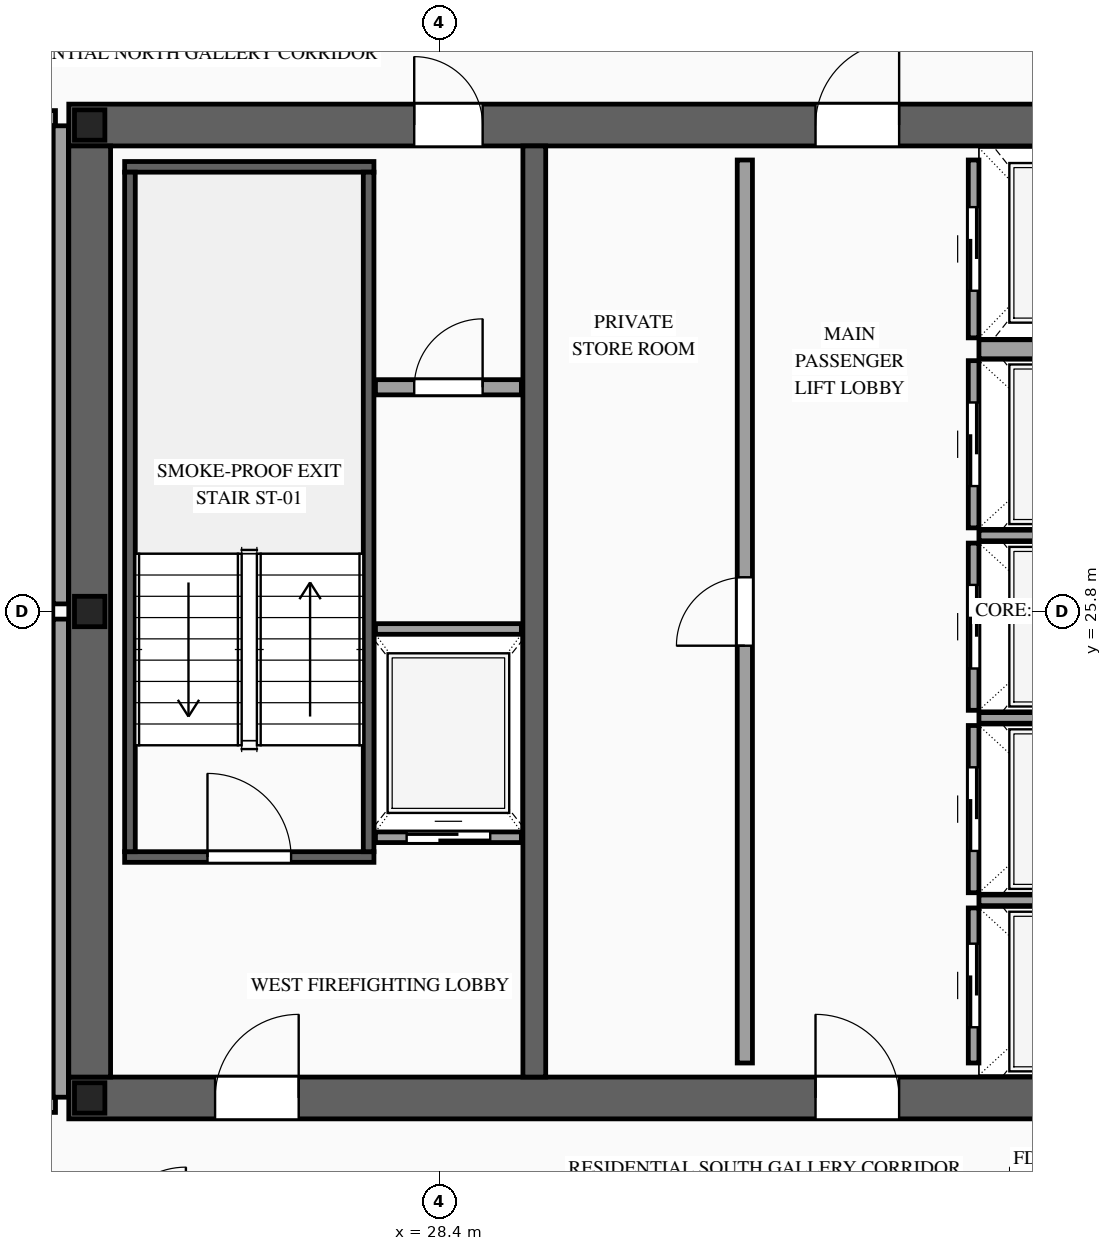
"""IFC4 building model, lengths in metres.
Left out: names, types, materials, properties, quantities, classifications, styles, units other than length and angle.
Written with IfcOpenShell. Run it as: python <this file> out.ifc"""

import sys

from ifc_helpers import new_model, si_unit, direction, frame, frame_2d, origin, origin_2d, place, context, subcontext, project, spatial, rectangle, i_section, extrude, source, transform, mapped, element, fill, save


model = new_model("IFC4")
c1 = context("Model", 3, precision=1e-05, world=origin(), true_north=direction((0.0, 1.0)))
c2 = subcontext(c1, "Body", "Model", "MODEL_VIEW")
j1 = project(units=[si_unit("LENGTHUNIT", "METRE"), si_unit("PLANEANGLEUNIT", "RADIAN")], contexts=[c1])
p1 = place(None, origin())
s1 = spatial("IfcSite", under=j1, at=p1, CompositionType="ELEMENT")
p2 = place(p1, origin())
s2 = spatial("IfcBuilding", under=s1, at=p2, CompositionType="ELEMENT")
p3 = place(p2, frame((0.0, 0.0, 248.6)))
s3 = spatial("IfcBuildingStorey", under=s2, at=p3, CompositionType="ELEMENT", Elevation=248.6)
p4 = place(p3, frame((23.525, 19.4, 0.0), z_axis=(0.0, 0.0, 1.0), x_axis=(1.0, 0.0, 0.0)))
e1 = element("IfcWall", 1, at=p4, inside=s3, PredefinedType="SHEAR", context=c2, shape_type="SweptSolid", body=[
    extrude(rectangle(XDim=26.95, YDim=0.55, at=frame_2d((13.475, 0.0))), origin(), (0.0, 0.0, 1.0), 3.5),
])
p5 = place(p4, frame((1.925, 0.0, 0.0)))
e2 = element("IfcOpeningElement", 2, at=p5, cuts=e1, PredefinedType="OPENING", context=c2, shape_type="SweptSolid", body=[
    extrude(rectangle(XDim=1.1, YDim=2.2, at=frame_2d((0.55, 1.1))), frame((0.0, 0.29, 0.0), z_axis=(0.0, -1.0, 0.0), x_axis=(1.0, 0.0, 0.0)), (0.0, 0.0, 1.0), 0.58),
])
p6 = place(p4, frame((9.825, 0.0, 0.0)))
e3 = element("IfcOpeningElement", 3, at=p6, cuts=e1, PredefinedType="OPENING", context=c2, shape_type="SweptSolid", body=[
    extrude(rectangle(XDim=1.1, YDim=2.2, at=frame_2d((0.55, 1.1))), frame((0.0, 0.29, 0.0), z_axis=(0.0, -1.0, 0.0), x_axis=(1.0, 0.0, 0.0)), (0.0, 0.0, 1.0), 0.58),
])
p7 = place(p4, frame((23.025, 0.0, 0.0)))
e4 = element("IfcOpeningElement", 4, at=p7, cuts=e1, PredefinedType="OPENING", context=c2, shape_type="SweptSolid", body=[
    extrude(rectangle(XDim=1.1, YDim=2.2, at=frame_2d((0.55, 1.1))), frame((0.0, 0.29, 0.0), z_axis=(0.0, -1.0, 0.0), x_axis=(1.0, 0.0, 0.0)), (0.0, 0.0, 1.0), 0.58),
])
p8 = place(p4, frame((19.645, 0.0, 0.0)))
e5 = element("IfcOpeningElement", 5, at=p8, cuts=e1, PredefinedType="OPENING", context=c2, shape_type="SweptSolid", body=[
    extrude(rectangle(XDim=0.9, YDim=2.15, at=frame_2d((0.45, 1.075))), frame((0.0, 0.29, 0.0), z_axis=(0.0, -1.0, 0.0), x_axis=(1.0, 0.0, 0.0)), (0.0, 0.0, 1.0), 0.58),
])
p9 = place(p4, frame((18.205, 0.0, 0.0)))
e6 = element("IfcOpeningElement", 6, at=p9, cuts=e1, PredefinedType="OPENING", context=c2, shape_type="SweptSolid", body=[
    extrude(rectangle(XDim=0.9, YDim=2.15, at=frame_2d((0.45, 1.075))), frame((0.0, 0.29, 0.0), z_axis=(0.0, -1.0, 0.0), x_axis=(1.0, 0.0, 0.0)), (0.0, 0.0, 1.0), 0.58),
])
p10 = place(p3, frame((23.525, 32.2, 0.0), z_axis=(0.0, 0.0, 1.0), x_axis=(1.0, 0.0, 0.0)))
e7 = element("IfcWall", 7, at=p10, inside=s3, PredefinedType="SHEAR", context=c2, shape_type="SweptSolid", body=[
    extrude(rectangle(XDim=26.95, YDim=0.55, at=frame_2d((13.475, 0.0))), origin(), (0.0, 0.0, 1.0), 3.5),
])
p11 = place(p10, frame((4.545, 0.0, 0.0)))
e8 = element("IfcOpeningElement", 8, at=p11, cuts=e7, PredefinedType="OPENING", context=c2, shape_type="SweptSolid", body=[
    extrude(rectangle(XDim=0.9, YDim=2.15, at=frame_2d((0.45, 1.075))), frame((0.0, 0.29, 0.0), z_axis=(0.0, -1.0, 0.0), x_axis=(1.0, 0.0, 0.0)), (0.0, 0.0, 1.0), 0.58),
])
p12 = place(p10, frame((9.825, 0.0, 0.0)))
e9 = element("IfcOpeningElement", 9, at=p12, cuts=e7, PredefinedType="OPENING", context=c2, shape_type="SweptSolid", body=[
    extrude(rectangle(XDim=1.1, YDim=2.2, at=frame_2d((0.55, 1.1))), frame((0.0, 0.29, 0.0), z_axis=(0.0, -1.0, 0.0), x_axis=(1.0, 0.0, 0.0)), (0.0, 0.0, 1.0), 0.58),
])
p13 = place(p10, frame((15.675, 0.0, 0.0)))
e10 = element("IfcOpeningElement", 10, at=p13, cuts=e7, PredefinedType="OPENING", context=c2, shape_type="SweptSolid", body=[
    extrude(rectangle(XDim=1.1, YDim=2.2, at=frame_2d((0.55, 1.1))), frame((0.0, 0.29, 0.0), z_axis=(0.0, -1.0, 0.0), x_axis=(1.0, 0.0, 0.0)), (0.0, 0.0, 1.0), 0.58),
])
m1 = source(origin(), c2, "Body", "SweptSolid", [
    extrude(rectangle(XDim=12.25, YDim=0.55, at=frame_2d((6.125, 0.0))), origin(), (0.0, 0.0, 1.0), 3.5),
])
p14 = place(p3, frame((23.8, 19.675, 0.0), z_axis=(0.0, 0.0, 1.0), x_axis=(0.0, 1.0, 0.0)))
e11 = element("IfcWall", 11, at=p14, inside=s3, PredefinedType="SHEAR", context=c2, shape_type="MappedRepresentation", body=[
    mapped(m1, transform((0.0, 0.0, 0.0), scale=1.0)),
])
m2 = source(origin(), c2, "Body", "SweptSolid", [
    extrude(rectangle(XDim=12.25, YDim=0.3, at=frame_2d((6.125, 0.0))), origin(), (0.0, 0.0, 1.0), 3.5),
])
p15 = place(p3, frame((29.65, 19.675, 0.0), z_axis=(0.0, 0.0, 1.0), x_axis=(0.0, 1.0, 0.0)))
e12 = element("IfcWall", 12, at=p15, inside=s3, PredefinedType="SOLIDWALL", context=c2, shape_type="MappedRepresentation", body=[
    mapped(m2, transform((0.0, 0.0, 0.0), scale=1.0)),
])
m3 = source(origin(), c2, "Body", "SweptSolid", [
    extrude(i_section(OverallWidth=0.4, OverallDepth=0.4, WebThickness=0.013, FlangeThickness=0.021, at=origin_2d()), origin(), (0.0, 0.0, 1.0), 3.5),
])
for number, where, z_axis, x_axis in (
    (13, (23.8, 19.4, 0.0), (0.0, 0.0, 1.0), (1.0, 0.0, 0.0)),
    (14, (23.8, 25.8, 0.0), (0.0, 0.0, 1.0), (1.0, 0.0, 0.0)),
    (15, (23.8, 32.2, 0.0), (0.0, 0.0, 1.0), (1.0, 0.0, 0.0)),
):
    element("IfcColumn", number, at=place(p3, frame(where, z_axis=z_axis, x_axis=x_axis)), inside=s3, PredefinedType="COLUMN", context=c2, shape_type="MappedRepresentation", body=[
        mapped(m3, transform((0.0, 0.0, 0.0), scale=1.0)),
    ])
p16 = place(p3, frame((27.56, 22.83, 0.0), z_axis=(0.0, 0.0, 1.0), x_axis=(1.0, 0.0, 0.0)))
e16 = element("IfcWall", 16, at=p16, inside=s3, PredefinedType="SOLIDWALL", context=c2, shape_type="SweptSolid", body=[
    extrude(rectangle(XDim=1.92, YDim=0.14, at=frame_2d((0.96, 0.0))), origin(), (0.0, 0.0, 1.0), 3.28),
])
p17 = place(p16, frame((0.41, 0.0, 0.0)))
e17 = element("IfcOpeningElement", 17, at=p17, cuts=e16, PredefinedType="OPENING", context=c2, shape_type="SweptSolid", body=[
    extrude(rectangle(XDim=1.1, YDim=2.2, at=frame_2d((0.55, 1.1))), frame((0.0, 0.085, 0.0), z_axis=(0.0, -1.0, 0.0), x_axis=(1.0, 0.0, 0.0)), (0.0, 0.0, 1.0), 0.17),
])
m4 = source(origin(), c2, "Body", "SweptSolid", [
    extrude(rectangle(XDim=1.92, YDim=0.14, at=frame_2d((0.96, 0.0))), origin(), (0.0, 0.0, 1.0), 3.28),
])
p18 = place(p3, frame((27.56, 25.57, 0.0), z_axis=(0.0, 0.0, 1.0), x_axis=(1.0, 0.0, 0.0)))
e18 = element("IfcWall", 18, at=p18, inside=s3, PredefinedType="SOLIDWALL", context=c2, shape_type="MappedRepresentation", body=[
    mapped(m4, transform((0.0, 0.0, 0.0), scale=1.0)),
])
p19 = place(p3, frame((35.43, 19.86, 0.0), z_axis=(0.0, 0.0, 1.0), x_axis=(0.0, 1.0, 0.0)))
e19 = element("IfcWall", 19, at=p19, inside=s3, PredefinedType="SOLIDWALL", context=c2, shape_type="SweptSolid", body=[
    extrude(rectangle(XDim=2.04, YDim=0.14, at=frame_2d((1.02, 0.0))), origin(), (0.0, 0.0, 1.0), 3.28),
])
p20 = place(p19, frame((0.47, 0.0, 0.0)))
e20 = element("IfcOpeningElement", 20, at=p20, cuts=e19, PredefinedType="OPENING", context=c2, shape_type="SweptSolid", body=[
    extrude(rectangle(XDim=1.1, YDim=2.2, at=frame_2d((0.55, 1.1))), frame((0.0, 0.085, 0.0), z_axis=(0.0, -1.0, 0.0), x_axis=(1.0, 0.0, 0.0)), (0.0, 0.0, 1.0), 0.17),
])
m5 = source(origin(), c2, "Body", "SweptSolid", [
    extrude(rectangle(XDim=2.4, YDim=0.14, at=frame_2d((1.2, 0.0))), origin(), (0.0, 0.0, 1.0), 3.28),
])
p21 = place(p3, frame((35.5, 22.0, 0.0), z_axis=(0.0, 0.0, 1.0), x_axis=(1.0, 0.0, 0.0)))
e21 = element("IfcWall", 21, at=p21, inside=s3, PredefinedType="SOLIDWALL", context=c2, shape_type="MappedRepresentation", body=[
    mapped(m5, transform((0.0, 0.0, 0.0), scale=1.0)),
])
p22 = place(p3, frame((35.43, 22.1, 0.0), z_axis=(0.0, 0.0, 1.0), x_axis=(0.0, 1.0, 0.0)))
e22 = element("IfcWall", 22, at=p22, inside=s3, PredefinedType="SOLIDWALL", context=c2, shape_type="SweptSolid", body=[
    extrude(rectangle(XDim=2.2, YDim=0.14, at=frame_2d((1.1, 0.0))), origin(), (0.0, 0.0, 1.0), 3.28),
])
p23 = place(p22, frame((0.55, 0.0, 0.0)))
e23 = element("IfcOpeningElement", 23, at=p23, cuts=e22, PredefinedType="OPENING", context=c2, shape_type="SweptSolid", body=[
    extrude(rectangle(XDim=1.1, YDim=2.2, at=frame_2d((0.55, 1.1))), frame((0.0, 0.085, 0.0), z_axis=(0.0, -1.0, 0.0), x_axis=(1.0, 0.0, 0.0)), (0.0, 0.0, 1.0), 0.17),
])
p24 = place(p3, frame((35.5, 24.4, 0.0), z_axis=(0.0, 0.0, 1.0), x_axis=(1.0, 0.0, 0.0)))
e24 = element("IfcWall", 24, at=p24, inside=s3, PredefinedType="SOLIDWALL", context=c2, shape_type="MappedRepresentation", body=[
    mapped(m5, transform((0.0, 0.0, 0.0), scale=1.0)),
])
p25 = place(p3, frame((35.43, 24.5, 0.0), z_axis=(0.0, 0.0, 1.0), x_axis=(0.0, 1.0, 0.0)))
e25 = element("IfcWall", 25, at=p25, inside=s3, PredefinedType="SOLIDWALL", context=c2, shape_type="SweptSolid", body=[
    extrude(rectangle(XDim=2.2, YDim=0.14, at=frame_2d((1.1, 0.0))), origin(), (0.0, 0.0, 1.0), 3.28),
])
p26 = place(p25, frame((0.55, 0.0, 0.0)))
e26 = element("IfcOpeningElement", 26, at=p26, cuts=e25, PredefinedType="OPENING", context=c2, shape_type="SweptSolid", body=[
    extrude(rectangle(XDim=1.1, YDim=2.2, at=frame_2d((0.55, 1.1))), frame((0.0, 0.085, 0.0), z_axis=(0.0, -1.0, 0.0), x_axis=(1.0, 0.0, 0.0)), (0.0, 0.0, 1.0), 0.17),
])
p27 = place(p3, frame((35.5, 26.8, 0.0), z_axis=(0.0, 0.0, 1.0), x_axis=(1.0, 0.0, 0.0)))
e27 = element("IfcWall", 27, at=p27, inside=s3, PredefinedType="SOLIDWALL", context=c2, shape_type="MappedRepresentation", body=[
    mapped(m5, transform((0.0, 0.0, 0.0), scale=1.0)),
])
p28 = place(p3, frame((35.43, 26.9, 0.0), z_axis=(0.0, 0.0, 1.0), x_axis=(0.0, 1.0, 0.0)))
e28 = element("IfcWall", 28, at=p28, inside=s3, PredefinedType="SOLIDWALL", context=c2, shape_type="SweptSolid", body=[
    extrude(rectangle(XDim=2.2, YDim=0.14, at=frame_2d((1.1, 0.0))), origin(), (0.0, 0.0, 1.0), 3.28),
])
p29 = place(p28, frame((0.55, 0.0, 0.0)))
e29 = element("IfcOpeningElement", 29, at=p29, cuts=e28, PredefinedType="OPENING", context=c2, shape_type="SweptSolid", body=[
    extrude(rectangle(XDim=1.1, YDim=2.2, at=frame_2d((0.55, 1.1))), frame((0.0, 0.085, 0.0), z_axis=(0.0, -1.0, 0.0), x_axis=(1.0, 0.0, 0.0)), (0.0, 0.0, 1.0), 0.17),
])
p30 = place(p3, frame((35.43, 29.4, 0.0), z_axis=(0.0, 0.0, 1.0), x_axis=(0.0, 1.0, 0.0)))
e30 = element("IfcWall", 30, at=p30, inside=s3, PredefinedType="SOLIDWALL", context=c2, shape_type="SweptSolid", body=[
    extrude(rectangle(XDim=2.34, YDim=0.14, at=frame_2d((1.17, 0.0))), origin(), (0.0, 0.0, 1.0), 3.28),
])
p31 = place(p30, frame((0.62, 0.0, 0.0)))
e31 = element("IfcOpeningElement", 31, at=p31, cuts=e30, PredefinedType="OPENING", context=c2, shape_type="SweptSolid", body=[
    extrude(rectangle(XDim=1.1, YDim=2.2, at=frame_2d((0.55, 1.1))), frame((0.0, 0.085, 0.0), z_axis=(0.0, -1.0, 0.0), x_axis=(1.0, 0.0, 0.0)), (0.0, 0.0, 1.0), 0.17),
])
m6 = source(origin(), c2, "Body", "SweptSolid", [
    extrude(rectangle(XDim=2.4, YDim=0.25, at=frame_2d((1.2, 0.0))), origin(), (0.0, 0.0, 1.0), 3.28),
])
p32 = place(p3, frame((35.5, 29.25, 0.0), z_axis=(0.0, 0.0, 1.0), x_axis=(1.0, 0.0, 0.0)))
e32 = element("IfcWall", 32, at=p32, inside=s3, PredefinedType="SOLIDWALL", context=c2, shape_type="MappedRepresentation", body=[
    mapped(m6, transform((0.0, 0.0, 0.0), scale=1.0)),
])
p33 = place(p3, frame((24.26, 22.57, 0.0), z_axis=(0.0, 0.0, 1.0), x_axis=(1.0, 0.0, 0.0)))
e33 = element("IfcWall", 33, at=p33, inside=s3, PredefinedType="SOLIDWALL", context=c2, shape_type="SweptSolid", body=[
    extrude(rectangle(XDim=3.28, YDim=0.14, at=frame_2d((1.64, 0.0))), origin(), (0.0, 0.0, 1.0), 3.28),
])
p34 = place(p33, frame((1.09, 0.0, 0.0)))
e34 = element("IfcOpeningElement", 34, at=p34, cuts=e33, PredefinedType="OPENING", context=c2, shape_type="SweptSolid", body=[
    extrude(rectangle(XDim=1.1, YDim=2.2, at=frame_2d((0.55, 1.1))), frame((0.0, 0.085, 0.0), z_axis=(0.0, -1.0, 0.0), x_axis=(1.0, 0.0, 0.0)), (0.0, 0.0, 1.0), 0.17),
])
m7 = source(origin(), c2, "Body", "SweptSolid", [
    extrude(rectangle(XDim=3.28, YDim=0.14, at=frame_2d((1.64, 0.0))), origin(), (0.0, 0.0, 1.0), 3.28),
])
p35 = place(p3, frame((24.26, 31.65, 0.0), z_axis=(0.0, 0.0, 1.0), x_axis=(1.0, 0.0, 0.0)))
e35 = element("IfcWall", 35, at=p35, inside=s3, PredefinedType="SOLIDWALL", context=c2, shape_type="MappedRepresentation", body=[
    mapped(m7, transform((0.0, 0.0, 0.0), scale=1.0)),
])
m8 = source(origin(), c2, "Body", "SweptSolid", [
    extrude(rectangle(XDim=8.94, YDim=0.14, at=frame_2d((4.47, 0.0))), origin(), (0.0, 0.0, 1.0), 3.28),
])
for number, where, z_axis, x_axis in (
    (36, (24.33, 22.64, 0.0), (0.0, 0.0, 1.0), (0.0, 1.0, 0.0)),
    (37, (27.47, 22.64, 0.0), (0.0, 0.0, 1.0), (0.0, 1.0, 0.0)),
):
    element("IfcWall", number, at=place(p3, frame(where, z_axis=z_axis, x_axis=x_axis)), inside=s3, PredefinedType="SOLIDWALL", context=c2, shape_type="MappedRepresentation", body=[
        mapped(m8, transform((0.0, 0.0, 0.0), scale=1.0)),
    ])
p36 = place(p3, frame((27.56, 28.75, 0.0), z_axis=(0.0, 0.0, 1.0), x_axis=(1.0, 0.0, 0.0)))
e38 = element("IfcWall", 38, at=p36, inside=s3, PredefinedType="PARTITIONING", context=c2, shape_type="SweptSolid", body=[
    extrude(rectangle(XDim=1.92, YDim=0.2, at=frame_2d((0.96, 0.0))), origin(), (0.0, 0.0, 1.0), 3.28),
])
p37 = place(p36, frame((0.51, 0.0, 0.0)))
e39 = element("IfcOpeningElement", 39, at=p37, cuts=e38, PredefinedType="OPENING", context=c2, shape_type="SweptSolid", body=[
    extrude(rectangle(XDim=0.9, YDim=2.15, at=frame_2d((0.45, 1.075))), frame((0.0, 0.115, 0.0), z_axis=(0.0, -1.0, 0.0), x_axis=(1.0, 0.0, 0.0)), (0.0, 0.0, 1.0), 0.23),
])
p38 = place(p3, frame((32.42, 19.86, 0.0), z_axis=(0.0, 0.0, 1.0), x_axis=(0.0, 1.0, 0.0)))
e40 = element("IfcWall", 40, at=p38, inside=s3, PredefinedType="PARTITIONING", context=c2, shape_type="SweptSolid", body=[
    extrude(rectangle(XDim=11.88, YDim=0.2, at=frame_2d((5.94, 0.0))), origin(), (0.0, 0.0, 1.0), 3.28),
])
p39 = place(p38, frame((5.49, 0.0, 0.0)))
e41 = element("IfcOpeningElement", 41, at=p39, cuts=e40, PredefinedType="OPENING", context=c2, shape_type="SweptSolid", body=[
    extrude(rectangle(XDim=0.9, YDim=2.15, at=frame_2d((0.45, 1.075))), frame((0.0, 0.115, 0.0), z_axis=(0.0, -1.0, 0.0), x_axis=(1.0, 0.0, 0.0)), (0.0, 0.0, 1.0), 0.23),
])
p40 = place(p3, frame((16.55, 19.31, 0.0), z_axis=(0.0, 0.0, 1.0), x_axis=(1.0, 0.0, 0.0)))
e42 = element("IfcWall", 42, at=p40, inside=s3, PredefinedType="PARTITIONING", context=c2, shape_type="SweptSolid", body=[
    extrude(rectangle(XDim=6.8, YDim=0.2, at=frame_2d((3.4, 0.0))), origin(), (0.0, 0.0, 1.0), 2.825),
])
p41 = place(p40, frame((3.0, 0.0, 0.0)))
e43 = element("IfcOpeningElement", 43, at=p41, cuts=e42, PredefinedType="OPENING", context=c2, shape_type="SweptSolid", body=[
    extrude(rectangle(XDim=1.0, YDim=2.2, at=frame_2d((0.5, 1.1))), frame((0.0, 0.115, 0.0), z_axis=(0.0, -1.0, 0.0), x_axis=(1.0, 0.0, 0.0)), (0.0, 0.0, 1.0), 0.23),
])
m9 = source(origin(), c2, "Body", "SweptSolid", [
    extrude(rectangle(XDim=6.765, YDim=0.2, at=frame_2d((3.382, 0.0))), origin(), (0.0, 0.0, 1.0), 2.787),
])
p42 = place(p3, frame((16.55, 25.8, 0.0), z_axis=(0.0, 0.0, 1.0), x_axis=(1.0, 0.0, 0.0)))
e44 = element("IfcWall", 44, at=p42, inside=s3, PredefinedType="PARTITIONING", context=c2, shape_type="MappedRepresentation", body=[
    mapped(m9, transform((0.0, 0.0, 0.0), scale=1.0)),
])
m10 = source(origin(), c2, "Body", "SweptSolid", [
    extrude(rectangle(XDim=6.29, YDim=0.2, at=frame_2d((3.145, 0.0))), origin(), (0.0, 0.0, 1.0), 3.28),
])
p43 = place(p3, frame((23.42, 19.41, 0.0), z_axis=(0.0, 0.0, 1.0), x_axis=(0.0, 1.0, 0.0)))
e45 = element("IfcWall", 45, at=p43, inside=s3, PredefinedType="PARTITIONING", context=c2, shape_type="MappedRepresentation", body=[
    mapped(m10, transform((0.0, 0.0, 0.0), scale=1.0)),
])
p44 = place(p3, frame((16.55, 32.29, 0.0), z_axis=(0.0, 0.0, 1.0), x_axis=(1.0, 0.0, 0.0)))
e46 = element("IfcWall", 46, at=p44, inside=s3, PredefinedType="PARTITIONING", context=c2, shape_type="SweptSolid", body=[
    extrude(rectangle(XDim=6.8, YDim=0.2, at=frame_2d((3.4, 0.0))), origin(), (0.0, 0.0, 1.0), 2.825),
])
p45 = place(p44, frame((2.965, 0.0, 0.0)))
e47 = element("IfcOpeningElement", 47, at=p45, cuts=e46, PredefinedType="OPENING", context=c2, shape_type="SweptSolid", body=[
    extrude(rectangle(XDim=1.0, YDim=2.2, at=frame_2d((0.5, 1.1))), frame((0.0, 0.115, 0.0), z_axis=(0.0, -1.0, 0.0), x_axis=(1.0, 0.0, 0.0)), (0.0, 0.0, 1.0), 0.23),
])
p46 = place(p3, frame((23.42, 25.9, 0.0), z_axis=(0.0, 0.0, 1.0), x_axis=(0.0, 1.0, 0.0)))
e48 = element("IfcWall", 48, at=p46, inside=s3, PredefinedType="PARTITIONING", context=c2, shape_type="MappedRepresentation", body=[
    mapped(m10, transform((0.0, 0.0, 0.0), scale=1.0)),
])
m11 = source(origin(), c2, "Body", "SweptSolid", [
    extrude(rectangle(XDim=1.1, YDim=2.2, at=frame_2d((0.55, 1.1))), frame((0.0, 0.025, 0.0), z_axis=(0.0, -1.0, 0.0), x_axis=(1.0, 0.0, 0.0)), (0.0, 0.0, 1.0), 0.05),
])
p47 = place(p17, origin())
e49 = element("IfcDoor", 49, at=p47, inside=s3, OperationType="SLIDING_TO_LEFT", PredefinedType="DOOR", context=c2, shape_type="MappedRepresentation", body=[
    mapped(m11, transform((0.0, 0.0, 0.0), scale=1.0)),
])
fill(e17, e49)
p48 = place(p20, origin())
e50 = element("IfcDoor", 50, at=p48, inside=s3, OperationType="SLIDING_TO_RIGHT", PredefinedType="DOOR", context=c2, shape_type="MappedRepresentation", body=[
    mapped(m11, transform((0.0, 0.0, 0.0), scale=1.0)),
])
fill(e20, e50)
p49 = place(p23, origin())
e51 = element("IfcDoor", 51, at=p49, inside=s3, OperationType="SLIDING_TO_LEFT", PredefinedType="DOOR", context=c2, shape_type="MappedRepresentation", body=[
    mapped(m11, transform((0.0, 0.0, 0.0), scale=1.0)),
])
fill(e23, e51)
p50 = place(p26, origin())
e52 = element("IfcDoor", 52, at=p50, inside=s3, OperationType="SLIDING_TO_RIGHT", PredefinedType="DOOR", context=c2, shape_type="MappedRepresentation", body=[
    mapped(m11, transform((0.0, 0.0, 0.0), scale=1.0)),
])
fill(e26, e52)
p51 = place(p29, origin())
e53 = element("IfcDoor", 53, at=p51, inside=s3, OperationType="SLIDING_TO_LEFT", PredefinedType="DOOR", context=c2, shape_type="MappedRepresentation", body=[
    mapped(m11, transform((0.0, 0.0, 0.0), scale=1.0)),
])
fill(e29, e53)
p52 = place(p31, origin())
e54 = element("IfcDoor", 54, at=p52, inside=s3, OperationType="SLIDING_TO_RIGHT", PredefinedType="DOOR", context=c2, shape_type="MappedRepresentation", body=[
    mapped(m11, transform((0.0, 0.0, 0.0), scale=1.0)),
])
fill(e31, e54)
m12 = source(origin(), c2, "Body", "SweptSolid", [
    extrude(rectangle(XDim=1.1, YDim=2.2, at=frame_2d((0.55, 1.1))), frame((0.0, 0.025, 0.0), z_axis=(0.0, -1.0, 0.0), x_axis=(1.0, 0.0, 0.0)), (0.0, 0.0, 1.0), 0.05),
])
p53 = place(p34, origin())
e55 = element("IfcDoor", 55, at=p53, inside=s3, OperationType="SINGLE_SWING_LEFT", PredefinedType="DOOR", context=c2, shape_type="MappedRepresentation", body=[
    mapped(m12, transform((0.0, 0.0, 0.0), scale=1.0)),
])
fill(e34, e55)
p54 = place(p5, origin())
e56 = element("IfcDoor", 56, at=p54, inside=s3, OperationType="SINGLE_SWING_RIGHT", PredefinedType="DOOR", context=c2, shape_type="MappedRepresentation", body=[
    mapped(m12, transform((0.0, 0.0, 0.0), scale=1.0)),
])
fill(e2, e56)
p55 = place(p6, origin())
e57 = element("IfcDoor", 57, at=p55, inside=s3, OperationType="SINGLE_SWING_LEFT", PredefinedType="DOOR", context=c2, shape_type="MappedRepresentation", body=[
    mapped(m12, transform((0.0, 0.0, 0.0), scale=1.0)),
])
fill(e3, e57)
m13 = source(origin(), c2, "Body", "SweptSolid", [
    extrude(rectangle(XDim=0.9, YDim=2.15, at=frame_2d((0.45, 1.075))), frame((0.0, 0.025, 0.0), z_axis=(0.0, -1.0, 0.0), x_axis=(1.0, 0.0, 0.0)), (0.0, 0.0, 1.0), 0.05),
])
p56 = place(p11, origin())
e58 = element("IfcDoor", 58, at=p56, inside=s3, OperationType="SINGLE_SWING_LEFT", PredefinedType="DOOR", context=c2, shape_type="MappedRepresentation", body=[
    mapped(m13, transform((0.0, 0.0, 0.0), scale=1.0)),
])
fill(e8, e58)
p57 = place(p12, origin())
e59 = element("IfcDoor", 59, at=p57, inside=s3, OperationType="SINGLE_SWING_RIGHT", PredefinedType="DOOR", context=c2, shape_type="MappedRepresentation", body=[
    mapped(m12, transform((0.0, 0.0, 0.0), scale=1.0)),
])
fill(e9, e59)
p58 = place(p37, origin())
e60 = element("IfcDoor", 60, at=p58, inside=s3, OperationType="SINGLE_SWING_RIGHT", PredefinedType="DOOR", context=c2, shape_type="MappedRepresentation", body=[
    mapped(m13, transform((0.0, 0.0, 0.0), scale=1.0)),
])
fill(e39, e60)
p59 = place(p39, origin())
e61 = element("IfcDoor", 61, at=p59, inside=s3, OperationType="SINGLE_SWING_LEFT", PredefinedType="DOOR", context=c2, shape_type="MappedRepresentation", body=[
    mapped(m13, transform((0.0, 0.0, 0.0), scale=1.0)),
])
fill(e41, e61)
save(model, sys.argv[1])
